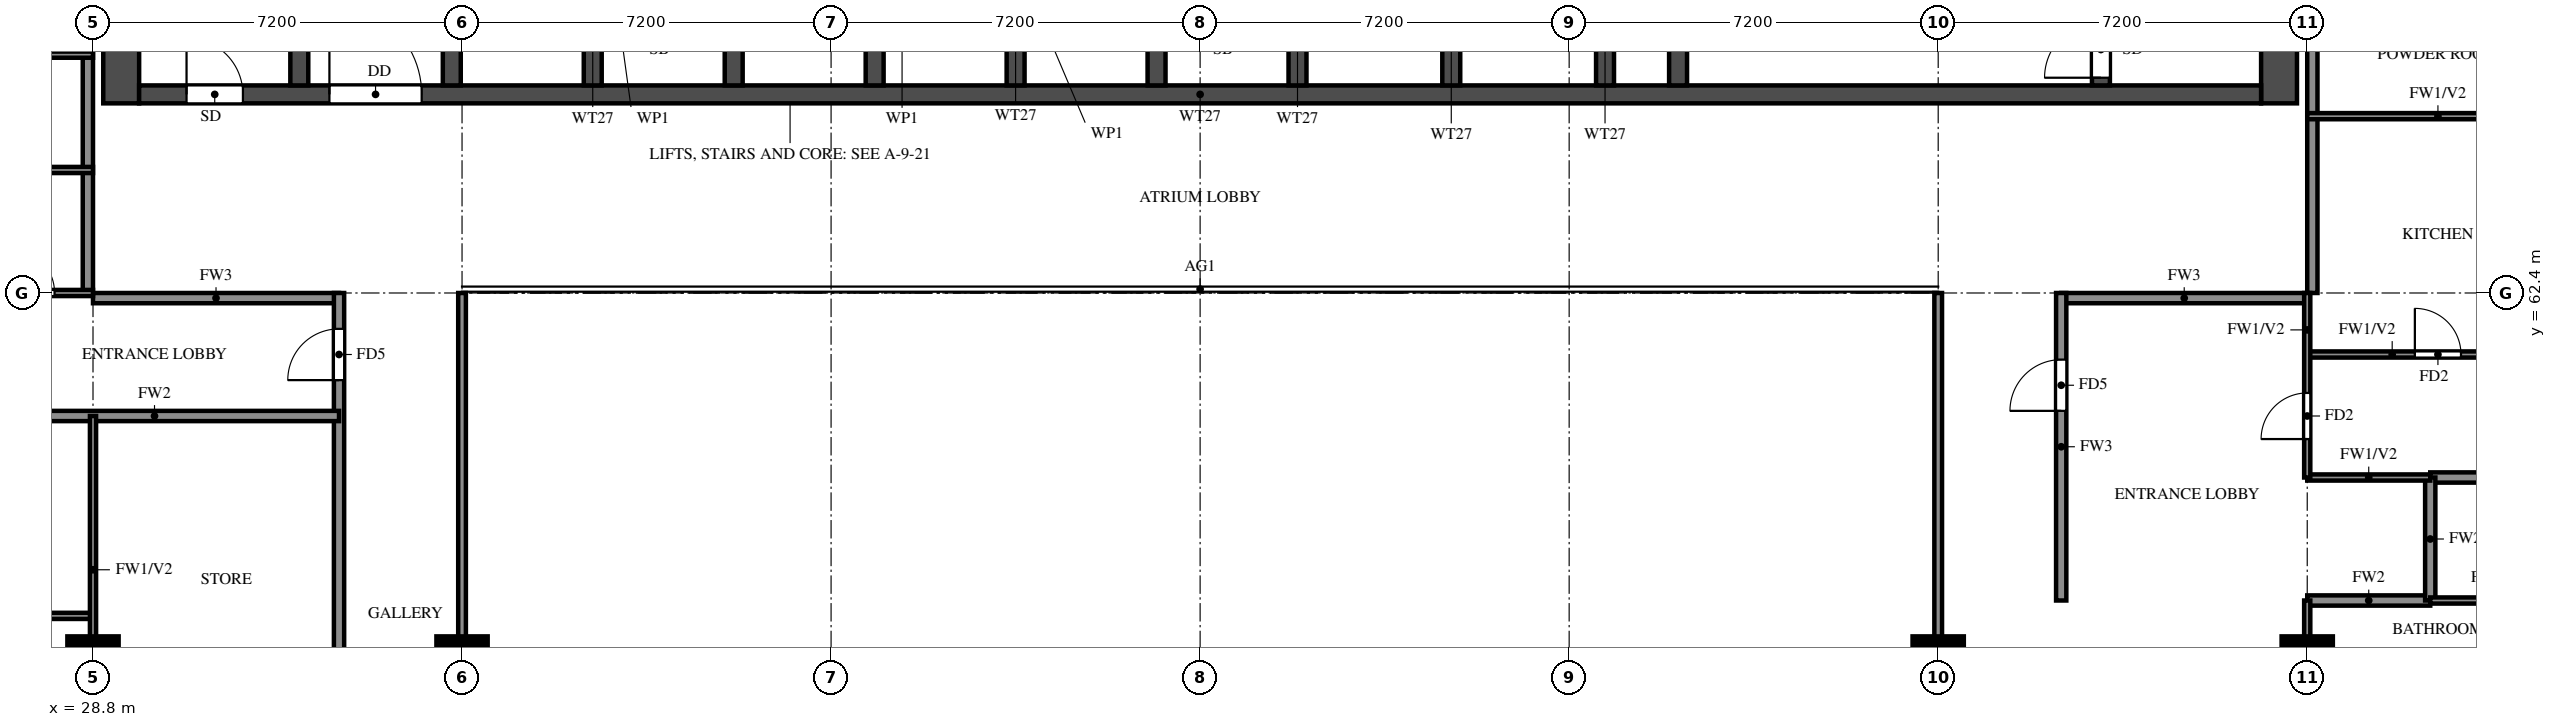
"""IFC4 building model, lengths in metres.
Left out: names, types, materials, properties, quantities, classifications, styles, units other than length and angle.
Written with IfcOpenShell. Run it as: python <this file> out.ifc"""

import sys

from ifc_helpers import new_model, si_unit, direction, frame, frame_2d, origin, origin_2d, place, context, subcontext, project, spatial, rectangle, extrude, source, transform, mapped, element, fill, save


model = new_model("IFC4")
c1 = context("Model", 3, precision=1e-05, world=origin(), true_north=direction((0.0, 1.0)))
c2 = subcontext(c1, "Body", "Model", "MODEL_VIEW")
j1 = project(units=[si_unit("LENGTHUNIT", "METRE"), si_unit("PLANEANGLEUNIT", "RADIAN")], contexts=[c1])
p1 = place(None, origin())
s1 = spatial("IfcSite", under=j1, at=p1, CompositionType="ELEMENT")
p2 = place(p1, origin())
s2 = spatial("IfcBuilding", under=s1, at=p2, CompositionType="ELEMENT")
p3 = place(p2, frame((0.0, 0.0, 143.0)))
s3 = spatial("IfcBuildingStorey", under=s2, at=p3, CompositionType="ELEMENT", Elevation=143.0)
m1 = source(origin(), c2, "Body", "SweptSolid", [
    extrude(rectangle(XDim=1.0, YDim=1.0, at=origin_2d()), origin(), (0.0, 0.0, 1.0), 3.2),
])
for number, where, z_axis, x_axis in (
    (1, (28.8, 55.2, 0.0), (0.0, 0.0, 1.0), (1.0, 0.0, 0.0)),
    (2, (36.0, 55.2, 0.0), (0.0, 0.0, 1.0), (1.0, 0.0, 0.0)),
    (3, (64.8, 55.2, 0.0), (0.0, 0.0, 1.0), (1.0, 0.0, 0.0)),
    (4, (72.0, 55.2, 0.0), (0.0, 0.0, 1.0), (1.0, 0.0, 0.0)),
):
    element("IfcColumn", number, at=place(p3, frame(where, z_axis=z_axis, x_axis=x_axis)), inside=s3, PredefinedType="COLUMN", context=c2, shape_type="MappedRepresentation", body=[
        mapped(m1, transform((0.0, 0.0, 0.0))),
    ])
for number, where, z_axis, x_axis in (
    (5, (29.35, 66.1, 0.0), (0.0, 0.0, 1.0), (0.0, 1.0, 0.0)),
    (6, (71.45, 66.1, 0.0), (0.0, 0.0, 1.0), (0.0, 1.0, 0.0)),
):
    element("IfcWall", number, at=place(p3, frame(where, z_axis=z_axis, x_axis=x_axis)), inside=s3, PredefinedType="SHEAR", context=c2, shape_type="SweptSolid", body=[
        extrude(rectangle(XDim=11.9, YDim=0.7, at=frame_2d((5.95, 0.0))), origin(), (0.0, 0.0, 1.0), 3.2),
    ])
p4 = place(p3, frame((29.7, 66.275, 0.0), z_axis=(0.0, 0.0, 1.0), x_axis=(1.0, 0.0, 0.0)))
e7 = element("IfcWall", 7, at=p4, inside=s3, PredefinedType="SHEAR", context=c2, shape_type="SweptSolid", body=[
    extrude(rectangle(XDim=41.4, YDim=0.35, at=frame_2d((20.7, 0.0))), origin(), (0.0, 0.0, 1.0), 3.2),
])
p5 = place(p4, frame((0.925, 0.0, 0.0)))
e8 = element("IfcOpeningElement", 8, at=p5, cuts=e7, PredefinedType="OPENING", context=c2, shape_type="SweptSolid", body=[
    extrude(rectangle(XDim=1.1, YDim=2.1, at=frame_2d((0.55, 1.05))), frame((0.0, 0.185, 0.0), z_axis=(0.0, -1.0, 0.0), x_axis=(1.0, 0.0, 0.0)), (0.0, 0.0, 1.0), 0.37),
])
p6 = place(p4, frame((3.712, 0.0, 0.0)))
e9 = element("IfcOpeningElement", 9, at=p6, cuts=e7, PredefinedType="OPENING", context=c2, shape_type="SweptSolid", body=[
    extrude(rectangle(XDim=1.8, YDim=2.1, at=frame_2d((0.9, 1.05))), frame((0.0, 0.185, 0.0), z_axis=(0.0, -1.0, 0.0), x_axis=(1.0, 0.0, 0.0)), (0.0, 0.0, 1.0), 0.37),
])
p7 = place(p3, frame((32.825, 66.45, 0.0), z_axis=(0.0, 0.0, 1.0), x_axis=(0.0, 1.0, 0.0)))
e10 = element("IfcWall", 10, at=p7, inside=s3, PredefinedType="SHEAR", context=c2, shape_type="SweptSolid", body=[
    extrude(rectangle(XDim=10.85, YDim=0.35, at=frame_2d((5.425, 0.0))), origin(), (0.0, 0.0, 1.0), 3.2),
])
p8 = place(p3, frame((67.975, 66.45, 0.0), z_axis=(0.0, 0.0, 1.0), x_axis=(0.0, 1.0, 0.0)))
e11 = element("IfcWall", 11, at=p8, inside=s3, PredefinedType="SHEAR", context=c2, shape_type="SweptSolid", body=[
    extrude(rectangle(XDim=10.85, YDim=0.35, at=frame_2d((5.425, 0.0))), origin(), (0.0, 0.0, 1.0), 3.2),
])
p9 = place(p8, frame((0.15, 0.0, 0.0)))
e12 = element("IfcOpeningElement", 12, at=p9, cuts=e11, PredefinedType="OPENING", context=c2, shape_type="SweptSolid", body=[
    extrude(rectangle(XDim=1.1, YDim=2.1, at=frame_2d((0.55, 1.05))), frame((0.0, 0.185, 0.0), z_axis=(0.0, -1.0, 0.0), x_axis=(1.0, 0.0, 0.0)), (0.0, 0.0, 1.0), 0.37),
])
p10 = place(p3, frame((59.725, 66.45, 0.0), z_axis=(0.0, 0.0, 1.0), x_axis=(0.0, 1.0, 0.0)))
e13 = element("IfcWall", 13, at=p10, inside=s3, PredefinedType="SHEAR", context=c2, shape_type="SweptSolid", body=[
    extrude(rectangle(XDim=6.125, YDim=0.35, at=frame_2d((3.062, 0.0))), origin(), (0.0, 0.0, 1.0), 3.2),
])
p11 = place(p10, frame((3.85, 0.0, 0.0)))
e14 = element("IfcOpeningElement", 14, at=p11, cuts=e13, PredefinedType="OPENING", context=c2, shape_type="SweptSolid", body=[
    extrude(rectangle(XDim=1.2, YDim=2.1, at=frame_2d((0.6, 1.05))), frame((0.0, 0.185, 0.0), z_axis=(0.0, -1.0, 0.0), x_axis=(1.0, 0.0, 0.0)), (0.0, 0.0, 1.0), 0.37),
])
for number, where, z_axis, x_axis in (
    (15, (35.8, 66.45, 0.0), (0.0, 0.0, 1.0), (0.0, 1.0, 0.0)),
    (16, (38.55, 66.45, 0.0), (0.0, 0.0, 1.0), (0.0, 1.0, 0.0)),
    (17, (41.3, 66.45, 0.0), (0.0, 0.0, 1.0), (0.0, 1.0, 0.0)),
    (18, (44.05, 66.45, 0.0), (0.0, 0.0, 1.0), (0.0, 1.0, 0.0)),
    (19, (46.8, 66.45, 0.0), (0.0, 0.0, 1.0), (0.0, 1.0, 0.0)),
    (20, (49.55, 66.45, 0.0), (0.0, 0.0, 1.0), (0.0, 1.0, 0.0)),
    (21, (52.3, 66.45, 0.0), (0.0, 0.0, 1.0), (0.0, 1.0, 0.0)),
    (22, (55.3, 66.45, 0.0), (0.0, 0.0, 1.0), (0.0, 1.0, 0.0)),
    (23, (58.3, 66.45, 0.0), (0.0, 0.0, 1.0), (0.0, 1.0, 0.0)),
):
    element("IfcWall", number, at=place(p3, frame(where, z_axis=z_axis, x_axis=x_axis)), inside=s3, PredefinedType="SHEAR", context=c2, shape_type="SweptSolid", body=[
        extrude(rectangle(XDim=2.425, YDim=0.35, at=frame_2d((1.212, 0.0))), origin(), (0.0, 0.0, 1.0), 3.2),
    ])
for number, where, z_axis, x_axis in (
    (24, (28.8, 62.3, 0.0), (0.0, 0.0, 1.0), (1.0, 0.0, 0.0)),
    (25, (67.2, 62.3, 0.0), (0.0, 0.0, 1.0), (1.0, 0.0, 0.0)),
):
    element("IfcWall", number, at=place(p3, frame(where, z_axis=z_axis, x_axis=x_axis)), inside=s3, PredefinedType="SOLIDWALL", context=c2, shape_type="SweptSolid", body=[
        extrude(rectangle(XDim=4.8, YDim=0.2, at=frame_2d((2.4, 0.0))), origin(), (0.0, 0.0, 1.0), 3.2),
    ])
p12 = place(p3, frame((28.7, 62.4, 0.0), z_axis=(0.0, 0.0, 1.0), x_axis=(0.0, 1.0, 0.0)))
e26 = element("IfcWall", 26, at=p12, inside=s3, PredefinedType="SOLIDWALL", context=c2, shape_type="SweptSolid", body=[
    extrude(rectangle(XDim=15.6, YDim=0.2, at=frame_2d((7.8, 0.0))), origin(), (0.0, 0.0, 1.0), 3.2),
])
p13 = place(p3, frame((33.6, 45.6, 0.0), z_axis=(0.0, 0.0, 1.0), x_axis=(0.0, 1.0, 0.0)))
e27 = element("IfcWall", 27, at=p13, inside=s3, PredefinedType="SOLIDWALL", context=c2, shape_type="SweptSolid", body=[
    extrude(rectangle(XDim=16.8, YDim=0.2, at=frame_2d((8.4, 0.0))), origin(), (0.0, 0.0, 1.0), 3.2),
])
p14 = place(p13, frame((0.7, 0.0, 0.0)))
e28 = element("IfcOpeningElement", 28, at=p14, cuts=e27, PredefinedType="OPENING", context=c2, shape_type="SweptSolid", body=[
    extrude(rectangle(XDim=1.0, YDim=2.1, at=frame_2d((0.5, 1.05))), frame((0.0, 0.11, 0.0), z_axis=(0.0, -1.0, 0.0), x_axis=(1.0, 0.0, 0.0)), (0.0, 0.0, 1.0), 0.22),
])
p15 = place(p13, frame((6.7, 0.0, 0.0)))
e29 = element("IfcOpeningElement", 29, at=p15, cuts=e27, PredefinedType="OPENING", context=c2, shape_type="SweptSolid", body=[
    extrude(rectangle(XDim=1.0, YDim=2.1, at=frame_2d((0.5, 1.05))), frame((0.0, 0.11, 0.0), z_axis=(0.0, -1.0, 0.0), x_axis=(1.0, 0.0, 0.0)), (0.0, 0.0, 1.0), 0.22),
])
p16 = place(p13, frame((15.1, 0.0, 0.0)))
e30 = element("IfcOpeningElement", 30, at=p16, cuts=e27, PredefinedType="OPENING", context=c2, shape_type="SweptSolid", body=[
    extrude(rectangle(XDim=1.0, YDim=2.1, at=frame_2d((0.5, 1.05))), frame((0.0, 0.11, 0.0), z_axis=(0.0, -1.0, 0.0), x_axis=(1.0, 0.0, 0.0)), (0.0, 0.0, 1.0), 0.22),
])
p17 = place(p3, frame((67.2, 56.4, 0.0), z_axis=(0.0, 0.0, 1.0), x_axis=(0.0, 1.0, 0.0)))
e31 = element("IfcWall", 31, at=p17, inside=s3, PredefinedType="SOLIDWALL", context=c2, shape_type="SweptSolid", body=[
    extrude(rectangle(XDim=6.0, YDim=0.2, at=frame_2d((3.0, 0.0))), origin(), (0.0, 0.0, 1.0), 3.2),
])
p18 = place(p17, frame((3.7, 0.0, 0.0)))
e32 = element("IfcOpeningElement", 32, at=p18, cuts=e31, PredefinedType="OPENING", context=c2, shape_type="SweptSolid", body=[
    extrude(rectangle(XDim=1.0, YDim=2.1, at=frame_2d((0.5, 1.05))), frame((0.0, 0.11, 0.0), z_axis=(0.0, -1.0, 0.0), x_axis=(1.0, 0.0, 0.0)), (0.0, 0.0, 1.0), 0.22),
])
p19 = place(p3, frame((72.1, 62.4, 0.0), z_axis=(0.0, 0.0, 1.0), x_axis=(0.0, 1.0, 0.0)))
e33 = element("IfcWall", 33, at=p19, inside=s3, PredefinedType="SOLIDWALL", context=c2, shape_type="SweptSolid", body=[
    extrude(rectangle(XDim=15.6, YDim=0.2, at=frame_2d((7.8, 0.0))), origin(), (0.0, 0.0, 1.0), 3.2),
])
p20 = place(p3, frame((72.0, 56.4, 0.0), z_axis=(0.0, 0.0, 1.0), x_axis=(1.0, 0.0, 0.0)))
e34 = element("IfcWall", 34, at=p20, inside=s3, PredefinedType="SOLIDWALL", context=c2, shape_type="SweptSolid", body=[
    extrude(rectangle(XDim=2.4, YDim=0.2, at=frame_2d((1.2, 0.0))), origin(), (0.0, 0.0, 1.0), 3.2),
])
p21 = place(p3, frame((74.4, 58.8, 0.0), z_axis=(0.0, 0.0, 1.0), x_axis=(1.0, 0.0, 0.0)))
e35 = element("IfcWall", 35, at=p21, inside=s3, PredefinedType="SOLIDWALL", context=c2, shape_type="SweptSolid", body=[
    extrude(rectangle(XDim=11.875, YDim=0.2, at=frame_2d((5.938, 0.0))), origin(), (0.0, 0.0, 1.0), 2.3),
])
p22 = place(p3, frame((26.4, 60.0, 0.0), z_axis=(0.0, 0.0, 1.0), x_axis=(1.0, 0.0, 0.0)))
e36 = element("IfcWall", 36, at=p22, inside=s3, PredefinedType="SOLIDWALL", context=c2, shape_type="SweptSolid", body=[
    extrude(rectangle(XDim=7.2, YDim=0.2, at=frame_2d((3.6, 0.0))), origin(), (0.0, 0.0, 1.0), 3.2),
])
p23 = place(p3, frame((74.4, 56.4, 0.0), z_axis=(0.0, 0.0, 1.0), x_axis=(0.0, 1.0, 0.0)))
e37 = element("IfcWall", 37, at=p23, inside=s3, PredefinedType="SOLIDWALL", context=c2, shape_type="SweptSolid", body=[
    extrude(rectangle(XDim=2.4, YDim=0.2, at=frame_2d((1.2, 0.0))), origin(), (0.0, 0.0, 1.0), 3.2),
])
p24 = place(p3, frame((23.7, 56.1, 0.0), z_axis=(0.0, 0.0, 1.0), x_axis=(1.0, 0.0, 0.0)))
e38 = element("IfcWall", 38, at=p24, inside=s3, PredefinedType="PARTITIONING", context=c2, shape_type="SweptSolid", body=[
    extrude(rectangle(XDim=5.1, YDim=0.12, at=frame_2d((2.55, 0.0))), origin(), (0.0, 0.0, 1.0), 3.2),
])
p25 = place(p3, frame((74.4, 56.4, 0.0), z_axis=(0.0, 0.0, 1.0), x_axis=(1.0, 0.0, 0.0)))
e39 = element("IfcWall", 39, at=p25, inside=s3, PredefinedType="PARTITIONING", context=c2, shape_type="SweptSolid", body=[
    extrude(rectangle(XDim=2.7, YDim=0.12, at=frame_2d((1.35, 0.0))), origin(), (0.0, 0.0, 1.0), 3.2),
])
p26 = place(p3, frame((72.0, 58.8, 0.0), z_axis=(0.0, 0.0, 1.0), x_axis=(1.0, 0.0, 0.0)))
e40 = element("IfcWall", 40, at=p26, inside=s3, PredefinedType="PARTITIONING", context=c2, shape_type="SweptSolid", body=[
    extrude(rectangle(XDim=2.4, YDim=0.12, at=frame_2d((1.2, 0.0))), origin(), (0.0, 0.0, 1.0), 3.2),
])
p27 = place(p3, frame((72.0, 61.2, 0.0), z_axis=(0.0, 0.0, 1.0), x_axis=(1.0, 0.0, 0.0)))
e41 = element("IfcWall", 41, at=p27, inside=s3, PredefinedType="PARTITIONING", context=c2, shape_type="SweptSolid", body=[
    extrude(rectangle(XDim=5.1, YDim=0.12, at=frame_2d((2.55, 0.0))), origin(), (0.0, 0.0, 1.0), 3.2),
])
p28 = place(p27, frame((2.1, 0.0, 0.0)))
e42 = element("IfcOpeningElement", 42, at=p28, cuts=e41, PredefinedType="OPENING", context=c2, shape_type="SweptSolid", body=[
    extrude(rectangle(XDim=0.9, YDim=2.1, at=frame_2d((0.45, 1.05))), frame((0.0, 0.07, 0.0), z_axis=(0.0, -1.0, 0.0), x_axis=(1.0, 0.0, 0.0)), (0.0, 0.0, 1.0), 0.14),
])
p29 = place(p3, frame((26.4, 62.4, 0.0), z_axis=(0.0, 0.0, 1.0), x_axis=(1.0, 0.0, 0.0)))
e43 = element("IfcWall", 43, at=p29, inside=s3, PredefinedType="PARTITIONING", context=c2, shape_type="SweptSolid", body=[
    extrude(rectangle(XDim=2.4, YDim=0.12, at=frame_2d((1.2, 0.0))), origin(), (0.0, 0.0, 1.0), 3.2),
])
p30 = place(p29, frame((0.75, 0.0, 0.0)))
e44 = element("IfcOpeningElement", 44, at=p30, cuts=e43, PredefinedType="OPENING", context=c2, shape_type="SweptSolid", body=[
    extrude(rectangle(XDim=0.9, YDim=2.1, at=frame_2d((0.45, 1.05))), frame((0.0, 0.07, 0.0), z_axis=(0.0, -1.0, 0.0), x_axis=(1.0, 0.0, 0.0)), (0.0, 0.0, 1.0), 0.14),
])
p31 = place(p3, frame((23.7, 64.8, 0.0), z_axis=(0.0, 0.0, 1.0), x_axis=(1.0, 0.0, 0.0)))
e45 = element("IfcWall", 45, at=p31, inside=s3, PredefinedType="PARTITIONING", context=c2, shape_type="SweptSolid", body=[
    extrude(rectangle(XDim=5.1, YDim=0.12, at=frame_2d((2.55, 0.0))), origin(), (0.0, 0.0, 1.0), 3.2),
])
p32 = place(p31, frame((2.1, 0.0, 0.0)))
e46 = element("IfcOpeningElement", 46, at=p32, cuts=e45, PredefinedType="OPENING", context=c2, shape_type="SweptSolid", body=[
    extrude(rectangle(XDim=0.9, YDim=2.1, at=frame_2d((0.45, 1.05))), frame((0.0, 0.07, 0.0), z_axis=(0.0, -1.0, 0.0), x_axis=(1.0, 0.0, 0.0)), (0.0, 0.0, 1.0), 0.14),
])
for number, where, z_axis, x_axis in (
    (47, (72.0, 65.85, 0.0), (0.0, 0.0, 1.0), (1.0, 0.0, 0.0)),
    (48, (23.7, 67.05, 0.0), (0.0, 0.0, 1.0), (1.0, 0.0, 0.0)),
):
    element("IfcWall", number, at=place(p3, frame(where, z_axis=z_axis, x_axis=x_axis)), inside=s3, PredefinedType="PARTITIONING", context=c2, shape_type="SweptSolid", body=[
        extrude(rectangle(XDim=5.1, YDim=0.12, at=frame_2d((2.55, 0.0))), origin(), (0.0, 0.0, 1.0), 3.2),
    ])
p33 = place(p3, frame((28.8, 54.0, 0.0), z_axis=(0.0, 0.0, 1.0), x_axis=(0.0, 1.0, 0.0)))
e49 = element("IfcWall", 49, at=p33, inside=s3, PredefinedType="PARTITIONING", context=c2, shape_type="SweptSolid", body=[
    extrude(rectangle(XDim=6.0, YDim=0.12, at=frame_2d((3.0, 0.0))), origin(), (0.0, 0.0, 1.0), 3.2),
])
p34 = place(p3, frame((72.0, 54.0, 0.0), z_axis=(0.0, 0.0, 1.0), x_axis=(0.0, 1.0, 0.0)))
e50 = element("IfcWall", 50, at=p34, inside=s3, PredefinedType="PARTITIONING", context=c2, shape_type="SweptSolid", body=[
    extrude(rectangle(XDim=2.4, YDim=0.12, at=frame_2d((1.2, 0.0))), origin(), (0.0, 0.0, 1.0), 3.2),
])
p35 = place(p3, frame((72.0, 58.8, 0.0), z_axis=(0.0, 0.0, 1.0), x_axis=(0.0, 1.0, 0.0)))
e51 = element("IfcWall", 51, at=p35, inside=s3, PredefinedType="PARTITIONING", context=c2, shape_type="SweptSolid", body=[
    extrude(rectangle(XDim=3.6, YDim=0.12, at=frame_2d((1.8, 0.0))), origin(), (0.0, 0.0, 1.0), 3.2),
])
p36 = place(p35, frame((0.75, 0.0, 0.0)))
e52 = element("IfcOpeningElement", 52, at=p36, cuts=e51, PredefinedType="OPENING", context=c2, shape_type="SweptSolid", body=[
    extrude(rectangle(XDim=0.9, YDim=2.1, at=frame_2d((0.45, 1.05))), frame((0.0, 0.07, 0.0), z_axis=(0.0, -1.0, 0.0), x_axis=(1.0, 0.0, 0.0)), (0.0, 0.0, 1.0), 0.14),
])
for number, where, z_axis, x_axis in (
    (53, (36.0, 48.0, 0.0), (0.0, 0.0, 1.0), (0.0, 1.0, 0.0)),
    (54, (64.8, 48.0, 0.0), (0.0, 0.0, 1.0), (0.0, 1.0, 0.0)),
):
    element("IfcWall", number, at=place(p3, frame(where, z_axis=z_axis, x_axis=x_axis)), inside=s3, PredefinedType="SOLIDWALL", context=c2, shape_type="SweptSolid", body=[
        extrude(rectangle(XDim=14.4, YDim=0.15, at=frame_2d((7.2, 0.0))), origin(), (0.0, 0.0, 1.0), 2.3),
    ])
p37 = place(p5, origin())
e55 = element("IfcDoor", 55, at=p37, inside=s3, OperationType="SINGLE_SWING_LEFT", PredefinedType="DOOR", context=c2, shape_type="SweptSolid", body=[
    extrude(rectangle(XDim=1.1, YDim=2.1, at=frame_2d((0.55, 1.05))), frame((0.0, 0.025, 0.0), z_axis=(0.0, -1.0, 0.0), x_axis=(1.0, 0.0, 0.0)), (0.0, 0.0, 1.0), 0.05),
])
fill(e8, e55)
p38 = place(p9, origin())
e56 = element("IfcDoor", 56, at=p38, inside=s3, OperationType="SINGLE_SWING_LEFT", PredefinedType="DOOR", context=c2, shape_type="SweptSolid", body=[
    extrude(rectangle(XDim=1.1, YDim=2.1, at=frame_2d((0.55, 1.05))), frame((0.0, 0.025, 0.0), z_axis=(0.0, -1.0, 0.0), x_axis=(1.0, 0.0, 0.0)), (0.0, 0.0, 1.0), 0.05),
])
fill(e12, e56)
p39 = place(p6, origin())
e57 = element("IfcDoor", 57, at=p39, inside=s3, OperationType="DOUBLE_DOOR_SINGLE_SWING", PredefinedType="DOOR", context=c2, shape_type="SweptSolid", body=[
    extrude(rectangle(XDim=1.8, YDim=2.1, at=frame_2d((0.9, 1.05))), frame((0.0, 0.025, 0.0), z_axis=(0.0, -1.0, 0.0), x_axis=(1.0, 0.0, 0.0)), (0.0, 0.0, 1.0), 0.05),
])
fill(e9, e57)
p40 = place(p30, origin())
e58 = element("IfcDoor", 58, at=p40, inside=s3, OperationType="SINGLE_SWING_LEFT", PredefinedType="DOOR", context=c2, shape_type="SweptSolid", body=[
    extrude(rectangle(XDim=0.9, YDim=2.1, at=frame_2d((0.45, 1.05))), frame((0.0, 0.025, 0.0), z_axis=(0.0, -1.0, 0.0), x_axis=(1.0, 0.0, 0.0)), (0.0, 0.0, 1.0), 0.05),
])
fill(e44, e58)
p41 = place(p16, origin())
e59 = element("IfcDoor", 59, at=p41, inside=s3, OperationType="SINGLE_SWING_LEFT", PredefinedType="DOOR", context=c2, shape_type="SweptSolid", body=[
    extrude(rectangle(XDim=1.0, YDim=2.1, at=frame_2d((0.5, 1.05))), frame((0.0, 0.025, 0.0), z_axis=(0.0, -1.0, 0.0), x_axis=(1.0, 0.0, 0.0)), (0.0, 0.0, 1.0), 0.05),
])
fill(e30, e59)
p42 = place(p36, origin())
e60 = element("IfcDoor", 60, at=p42, inside=s3, OperationType="SINGLE_SWING_RIGHT", PredefinedType="DOOR", context=c2, shape_type="SweptSolid", body=[
    extrude(rectangle(XDim=0.9, YDim=2.1, at=frame_2d((0.45, 1.05))), frame((0.0, 0.025, 0.0), z_axis=(0.0, -1.0, 0.0), x_axis=(1.0, 0.0, 0.0)), (0.0, 0.0, 1.0), 0.05),
])
fill(e52, e60)
p43 = place(p18, origin())
e61 = element("IfcDoor", 61, at=p43, inside=s3, OperationType="SINGLE_SWING_LEFT", PredefinedType="DOOR", context=c2, shape_type="SweptSolid", body=[
    extrude(rectangle(XDim=1.0, YDim=2.1, at=frame_2d((0.5, 1.05))), frame((0.0, 0.025, 0.0), z_axis=(0.0, -1.0, 0.0), x_axis=(1.0, 0.0, 0.0)), (0.0, 0.0, 1.0), 0.05),
])
fill(e32, e61)
p44 = place(p28, origin())
e62 = element("IfcDoor", 62, at=p44, inside=s3, OperationType="SINGLE_SWING_LEFT", PredefinedType="DOOR", context=c2, shape_type="SweptSolid", body=[
    extrude(rectangle(XDim=0.9, YDim=2.1, at=frame_2d((0.45, 1.05))), frame((0.0, 0.025, 0.0), z_axis=(0.0, -1.0, 0.0), x_axis=(1.0, 0.0, 0.0)), (0.0, 0.0, 1.0), 0.05),
])
fill(e42, e62)
save(model, sys.argv[1])
